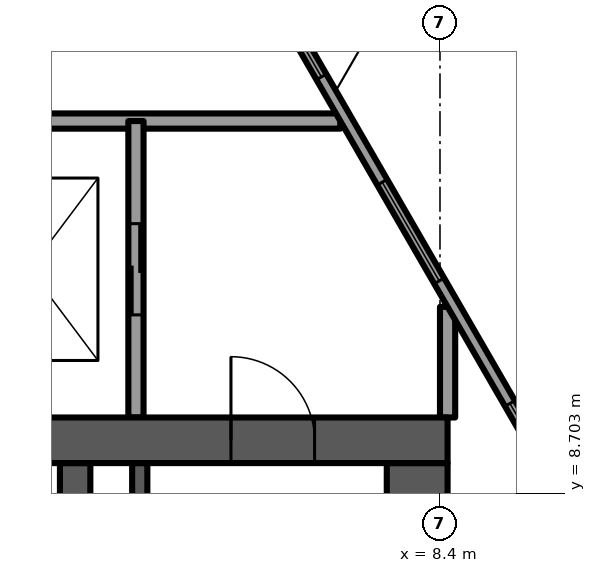
"""IFC4 building model, lengths in metres.
Left out: names, types, materials, properties, quantities, classifications, styles, units other than length and angle.
Written with IfcOpenShell. Run it as: python <this file> out.ifc"""

import sys

from ifc_helpers import new_model, si_unit, direction, frame, frame_2d, origin, place, context, subcontext, project, spatial, rectangle, extrude, element, fill, save


model = new_model("IFC4")
c1 = context("Model", 3, precision=1e-05, world=origin(), true_north=direction((0.0, 1.0)))
c2 = subcontext(c1, "Body", "Model", "MODEL_VIEW")
j1 = project(units=[si_unit("LENGTHUNIT", "METRE"), si_unit("PLANEANGLEUNIT", "RADIAN")], contexts=[c1])
p1 = place(None, origin())
s1 = spatial("IfcSite", under=j1, at=p1, CompositionType="ELEMENT")
p2 = place(p1, origin())
s2 = spatial("IfcBuilding", under=s1, at=p2, CompositionType="ELEMENT")
p3 = place(p2, frame((0.0, 0.0, 256.25)))
s3 = spatial("IfcBuildingStorey", under=s2, at=p3, CompositionType="ELEMENT", Elevation=256.25)
p4 = place(p3, frame((-8.5, 9.4, -0.3), z_axis=(0.0, 0.0, 1.0), x_axis=(1.0, 0.0, 0.0)))
e1 = element("IfcWall", 1, at=p4, inside=s3, PredefinedType="SHEAR", context=c2, shape_type="SweptSolid", body=[
    extrude(rectangle(XDim=17.0, YDim=0.6, at=frame_2d((8.5, 0.0))), origin(), (0.0, 0.0, 1.0), 3.75),
])
p5 = place(p4, frame((7.7, 0.0, 0.0)))
e2 = element("IfcOpeningElement", 2, at=p5, cuts=e1, PredefinedType="OPENING", context=c2, shape_type="SweptSolid", body=[
    extrude(rectangle(XDim=1.6, YDim=2.1, at=frame_2d((0.8, 1.05))), frame((0.0, 0.3, 0.0), z_axis=(0.0, -1.0, 0.0), x_axis=(1.0, 0.0, 0.0)), (0.0, 0.0, 1.0), 0.6),
])
p6 = place(p4, frame((1.75, 0.0, 0.0)))
e3 = element("IfcOpeningElement", 3, at=p6, cuts=e1, PredefinedType="OPENING", context=c2, shape_type="SweptSolid", body=[
    extrude(rectangle(XDim=1.1, YDim=2.1, at=frame_2d((0.55, 1.05))), frame((0.0, 0.3, 0.0), z_axis=(0.0, -1.0, 0.0), x_axis=(1.0, 0.0, 0.0)), (0.0, 0.0, 1.0), 0.6),
])
p7 = place(p4, frame((14.15, 0.0, 0.0)))
e4 = element("IfcOpeningElement", 4, at=p7, cuts=e1, PredefinedType="OPENING", context=c2, shape_type="SweptSolid", body=[
    extrude(rectangle(XDim=1.1, YDim=2.1, at=frame_2d((0.55, 1.05))), frame((0.0, 0.3, 0.0), z_axis=(0.0, -1.0, 0.0), x_axis=(1.0, 0.0, 0.0)), (0.0, 0.0, 1.0), 0.6),
])
p8 = place(p3, frame((8.1, -1.1, -0.3), z_axis=(0.0, 0.0, 1.0), x_axis=(0.0, 1.0, 0.0)))
e5 = element("IfcWall", 5, at=p8, inside=s3, PredefinedType="SHEAR", context=c2, shape_type="SweptSolid", body=[
    extrude(rectangle(XDim=10.2, YDim=0.8, at=frame_2d((5.1, 0.0))), origin(), (0.0, 0.0, 1.0), 3.75),
])
p9 = place(p8, frame((8.35, 0.0, 0.0)))
e6 = element("IfcOpeningElement", 6, at=p9, cuts=e5, PredefinedType="OPENING", context=c2, shape_type="SweptSolid", body=[
    extrude(rectangle(XDim=1.1, YDim=2.1, at=frame_2d((0.55, 1.05))), frame((0.0, 0.4, 0.0), z_axis=(0.0, -1.0, 0.0), x_axis=(1.0, 0.0, 0.0)), (0.0, 0.0, 1.0), 0.8),
])
p10 = place(p3, frame((3.6, -1.1, -0.3), z_axis=(0.0, 0.0, 1.0), x_axis=(0.0, 1.0, 0.0)))
e7 = element("IfcWall", 7, at=p10, inside=s3, PredefinedType="SHEAR", context=c2, shape_type="SweptSolid", body=[
    extrude(rectangle(XDim=10.2, YDim=0.4, at=frame_2d((5.1, 0.0))), origin(), (0.0, 0.0, 1.0), 3.75),
])
p11 = place(p3, frame((11.929, 11.217, 0.0), z_axis=(0.0, 0.0, 1.0), x_axis=(-0.500026811154, 0.866009923804, 0.0)))
e8 = element("IfcWall", 8, at=p11, inside=s3, PredefinedType="PARAPET", context=c2, shape_type="SweptSolid", body=[
    extrude(rectangle(XDim=6.018, YDim=0.9, at=frame_2d((3.009, 0.0))), origin(), (0.0, 0.0, 1.0), 1.1),
])
p12 = place(p3, frame((15.246, -0.378, 0.0), z_axis=(0.0, 0.0, 1.0), x_axis=(-0.500006153997, 0.866021850744, 0.0)))
e9 = element("IfcWall", 9, at=p12, inside=s3, PredefinedType="SOLIDWALL", context=c2, shape_type="SweptSolid", body=[
    extrude(rectangle(XDim=18.673, YDim=0.15, at=frame_2d((9.336, 0.0))), origin(), (0.0, 0.0, 1.0), 3.45),
])
p13 = place(p12, frame((4.051, 0.0, 0.15)))
e10 = element("IfcOpeningElement", 10, at=p13, cuts=e9, PredefinedType="OPENING", context=c2, shape_type="SweptSolid", body=[
    extrude(rectangle(XDim=0.9, YDim=2.85, at=frame_2d((0.45, 1.425))), frame((0.0, 0.075, 0.0), z_axis=(0.0, -1.0, 0.0), x_axis=(1.0, 0.0, 0.0)), (0.0, 0.0, 1.0), 0.15),
])
p14 = place(p12, frame((6.251, 0.0, 0.15)))
e11 = element("IfcOpeningElement", 11, at=p14, cuts=e9, PredefinedType="OPENING", context=c2, shape_type="SweptSolid", body=[
    extrude(rectangle(XDim=1.4, YDim=2.85, at=frame_2d((0.7, 1.425))), frame((0.0, 0.075, 0.0), z_axis=(0.0, -1.0, 0.0), x_axis=(1.0, 0.0, 0.0)), (0.0, 0.0, 1.0), 0.15),
])
p15 = place(p12, frame((8.251, 0.0, 0.15)))
e12 = element("IfcOpeningElement", 12, at=p15, cuts=e9, PredefinedType="OPENING", context=c2, shape_type="SweptSolid", body=[
    extrude(rectangle(XDim=0.9, YDim=2.85, at=frame_2d((0.45, 1.425))), frame((0.0, 0.075, 0.0), z_axis=(0.0, -1.0, 0.0), x_axis=(1.0, 0.0, 0.0)), (0.0, 0.0, 1.0), 0.15),
])
p16 = place(p12, frame((10.451, 0.0, 0.15)))
e13 = element("IfcOpeningElement", 13, at=p16, cuts=e9, PredefinedType="OPENING", context=c2, shape_type="SweptSolid", body=[
    extrude(rectangle(XDim=1.4, YDim=2.85, at=frame_2d((0.7, 1.425))), frame((0.0, 0.075, 0.0), z_axis=(0.0, -1.0, 0.0), x_axis=(1.0, 0.0, 0.0)), (0.0, 0.0, 1.0), 0.15),
])
p17 = place(p12, frame((13.712, 0.0, 0.15)))
e14 = element("IfcOpeningElement", 14, at=p17, cuts=e9, PredefinedType="OPENING", context=c2, shape_type="SweptSolid", body=[
    extrude(rectangle(XDim=1.5, YDim=2.85, at=frame_2d((0.75, 1.425))), frame((0.0, 0.075, 0.0), z_axis=(0.0, -1.0, 0.0), x_axis=(1.0, 0.0, 0.0)), (0.0, 0.0, 1.0), 0.15),
])
p18 = place(p12, frame((1.075, 0.0, 0.15)))
e15 = element("IfcOpeningElement", 15, at=p18, cuts=e9, PredefinedType="OPENING", context=c2, shape_type="SweptSolid", body=[
    extrude(rectangle(XDim=1.5, YDim=2.73, at=frame_2d((0.75, 1.365))), frame((0.0, 0.075, 0.0), z_axis=(0.0, -1.0, 0.0), x_axis=(1.0, 0.0, 0.0)), (0.0, 0.0, 1.0), 0.15),
])
p19 = place(p12, frame((16.812, 0.0, 0.15)))
e16 = element("IfcOpeningElement", 16, at=p19, cuts=e9, PredefinedType="OPENING", context=c2, shape_type="SweptSolid", body=[
    extrude(rectangle(XDim=1.5, YDim=2.73, at=frame_2d((0.75, 1.365))), frame((0.0, 0.075, 0.0), z_axis=(0.0, -1.0, 0.0), x_axis=(1.0, 0.0, 0.0)), (0.0, 0.0, 1.0), 0.15),
])
p20 = place(p3, frame((4.45, 0.9, -0.3), z_axis=(0.0, 0.0, 1.0), x_axis=(0.0, 1.0, 0.0)))
e17 = element("IfcWall", 17, at=p20, inside=s3, PredefinedType="SOLIDWALL", context=c2, shape_type="SweptSolid", body=[
    extrude(rectangle(XDim=8.2, YDim=0.2, at=frame_2d((4.1, 0.0))), origin(), (0.0, 0.0, 1.0), 3.75),
])
p21 = place(p3, frame((-7.089, 13.6, 0.0), z_axis=(0.0, 0.0, 1.0), x_axis=(1.0, 0.0, 0.0)))
e18 = element("IfcWall", 18, at=p21, inside=s3, PredefinedType="PARTITIONING", context=c2, shape_type="SweptSolid", body=[
    extrude(rectangle(XDim=14.177, YDim=0.2, at=frame_2d((7.089, 0.0))), origin(), (0.0, 0.0, 1.0), 3.45),
])
p22 = place(p21, frame((6.589, 0.0, 0.0)))
e19 = element("IfcOpeningElement", 19, at=p22, cuts=e18, PredefinedType="OPENING", context=c2, shape_type="SweptSolid", body=[
    extrude(rectangle(XDim=1.0, YDim=2.1, at=frame_2d((0.5, 1.05))), frame((0.0, 0.1, 0.0), z_axis=(0.0, -1.0, 0.0), x_axis=(1.0, 0.0, 0.0)), (0.0, 0.0, 1.0), 0.2),
])
p23 = place(p3, frame((8.5, 9.7, 0.0), z_axis=(0.0, 0.0, 1.0), x_axis=(0.0, 1.0, 0.0)))
e20 = element("IfcWall", 20, at=p23, inside=s3, PredefinedType="PARTITIONING", context=c2, shape_type="SweptSolid", body=[
    extrude(rectangle(XDim=1.456, YDim=0.2, at=frame_2d((0.728, 0.0))), origin(), (0.0, 0.0, 1.0), 3.45),
])
p24 = place(p3, frame((4.4, 9.7, 0.0), z_axis=(0.0, 0.0, 1.0), x_axis=(0.0, 1.0, 0.0)))
e21 = element("IfcWall", 21, at=p24, inside=s3, PredefinedType="PARTITIONING", context=c2, shape_type="SweptSolid", body=[
    extrude(rectangle(XDim=3.9, YDim=0.2, at=frame_2d((1.95, 0.0))), origin(), (0.0, 0.0, 1.0), 3.45),
])
p25 = place(p24, frame((1.35, 0.0, 0.0)))
e22 = element("IfcOpeningElement", 22, at=p25, cuts=e21, PredefinedType="OPENING", context=c2, shape_type="SweptSolid", body=[
    extrude(rectangle(XDim=1.2, YDim=2.1, at=frame_2d((0.6, 1.05))), frame((0.0, 0.1, 0.0), z_axis=(0.0, -1.0, 0.0), x_axis=(1.0, 0.0, 0.0)), (0.0, 0.0, 1.0), 0.2),
])
p26 = place(p16, origin())
e23 = element("IfcWindow", 23, at=p26, inside=s3, PartitioningType="SINGLE_PANEL", PredefinedType="WINDOW", context=c2, shape_type="SweptSolid", body=[
    extrude(rectangle(XDim=1.4, YDim=2.85, at=frame_2d((0.7, 1.425))), frame((0.0, 0.03, 0.0), z_axis=(0.0, -1.0, 0.0), x_axis=(1.0, 0.0, 0.0)), (0.0, 0.0, 1.0), 0.06),
])
fill(e13, e23)
p27 = place(p17, origin())
e24 = element("IfcWindow", 24, at=p27, inside=s3, PartitioningType="SINGLE_PANEL", PredefinedType="WINDOW", context=c2, shape_type="SweptSolid", body=[
    extrude(rectangle(XDim=1.5, YDim=2.85, at=frame_2d((0.75, 1.425))), frame((0.0, 0.03, 0.0), z_axis=(0.0, -1.0, 0.0), x_axis=(1.0, 0.0, 0.0)), (0.0, 0.0, 1.0), 0.06),
])
fill(e14, e24)
p28 = place(p19, origin())
e25 = element("IfcWindow", 25, at=p28, inside=s3, PartitioningType="SINGLE_PANEL", PredefinedType="WINDOW", context=c2, shape_type="SweptSolid", body=[
    extrude(rectangle(XDim=1.5, YDim=2.73, at=frame_2d((0.75, 1.365))), frame((0.0, 0.03, 0.0), z_axis=(0.0, -1.0, 0.0), x_axis=(1.0, 0.0, 0.0)), (0.0, 0.0, 1.0), 0.06),
])
fill(e16, e25)
p29 = place(p7, origin())
e26 = element("IfcDoor", 26, at=p29, inside=s3, OperationType="SINGLE_SWING_RIGHT", PredefinedType="DOOR", context=c2, shape_type="SweptSolid", body=[
    extrude(rectangle(XDim=1.1, YDim=2.1, at=frame_2d((0.55, 1.05))), frame((0.0, 0.025, 0.0), z_axis=(0.0, -1.0, 0.0), x_axis=(1.0, 0.0, 0.0)), (0.0, 0.0, 1.0), 0.05),
])
fill(e4, e26)
p30 = place(p25, origin())
e27 = element("IfcDoor", 27, at=p30, inside=s3, OperationType="SLIDING_TO_LEFT", PredefinedType="DOOR", context=c2, shape_type="SweptSolid", body=[
    extrude(rectangle(XDim=1.2, YDim=2.1, at=frame_2d((0.6, 1.05))), frame((0.0, 0.025, 0.0), z_axis=(0.0, -1.0, 0.0), x_axis=(1.0, 0.0, 0.0)), (0.0, 0.0, 1.0), 0.05),
])
fill(e22, e27)
save(model, sys.argv[1])
